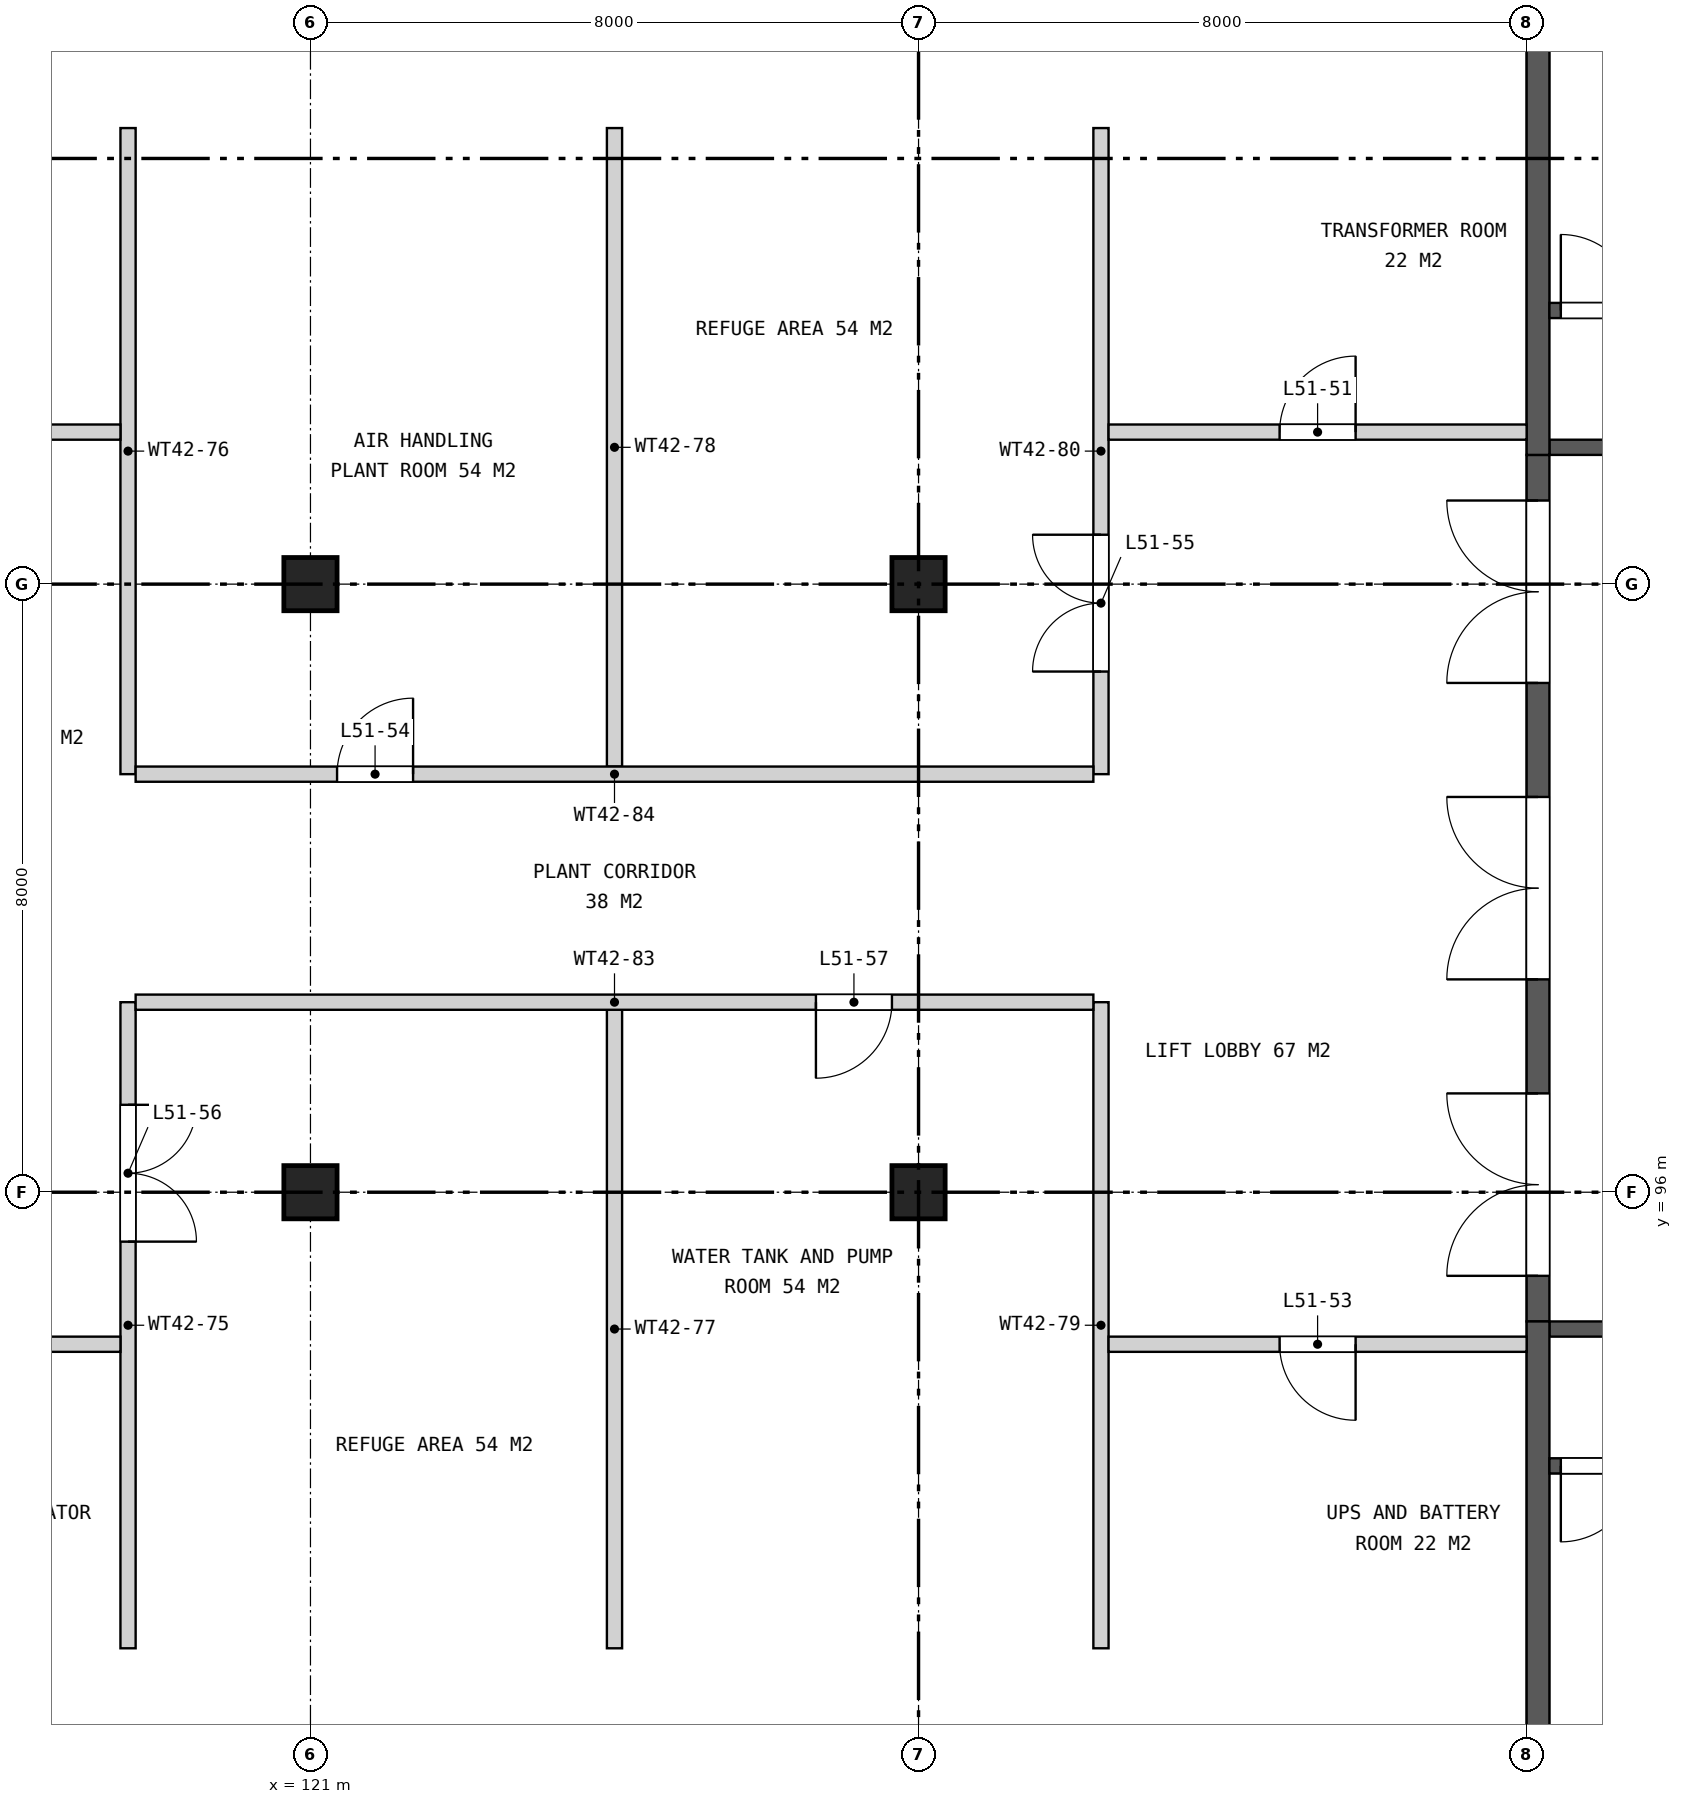
"""IFC4 building model, lengths in metres.
Left out: names, types, materials, properties, quantities, classifications, styles, units other than length and angle.
Written with IfcOpenShell. Run it as: python <this file> out.ifc"""

import sys

from ifc_helpers import new_model, si_unit, direction, frame, frame_2d, origin, origin_2d, place, context, subcontext, project, spatial, rectangle, extrude, element, fill, save


model = new_model("IFC4")
c1 = context("Model", 3, precision=1e-05, world=origin(), true_north=direction((0.0, 1.0)))
c2 = subcontext(c1, "Body", "Model", "MODEL_VIEW")
j1 = project(units=[si_unit("LENGTHUNIT", "METRE"), si_unit("PLANEANGLEUNIT", "RADIAN")], contexts=[c1])
p1 = place(None, origin())
s1 = spatial("IfcSite", under=j1, at=p1, CompositionType="ELEMENT")
p2 = place(p1, origin())
s2 = spatial("IfcBuilding", under=s1, at=p2, CompositionType="ELEMENT")
p3 = place(p2, frame((0.0, 0.0, 237.7)))
s3 = spatial("IfcBuildingStorey", under=s2, at=p3, CompositionType="ELEMENT", Elevation=237.7)
for number, where, z_axis, x_axis in (
    (1, (121.0, 96.0, 0.0), (0.0, 0.0, 1.0), (1.0, 0.0, 0.0)),
    (2, (121.0, 104.0, 0.0), (0.0, 0.0, 1.0), (1.0, 0.0, 0.0)),
    (3, (129.0, 96.0, 0.0), (0.0, 0.0, 1.0), (1.0, 0.0, 0.0)),
    (4, (129.0, 104.0, 0.0), (0.0, 0.0, 1.0), (1.0, 0.0, 0.0)),
):
    element("IfcColumn", number, at=place(p3, frame(where, z_axis=z_axis, x_axis=x_axis)), inside=s3, PredefinedType="COLUMN", context=c2, shape_type="SweptSolid", body=[
        extrude(rectangle(XDim=0.7, YDim=0.7, at=origin_2d()), origin(), (0.0, 0.0, 1.0), 7.4),
    ])
p4 = place(p3, frame((137.15, 94.3, 0.0), z_axis=(0.0, 0.0, 1.0), x_axis=(0.0, 1.0, 0.0)))
e5 = element("IfcWall", 5, at=p4, inside=s3, PredefinedType="SHEAR", context=c2, shape_type="SweptSolid", body=[
    extrude(rectangle(XDim=11.4, YDim=0.3, at=frame_2d((5.7, 0.0))), origin(), (0.0, 0.0, 1.0), 7.4),
])
p5 = place(p4, frame((0.6, 0.0, 0.0)))
e6 = element("IfcOpeningElement", 6, at=p5, cuts=e5, PredefinedType="OPENING", context=c2, shape_type="SweptSolid", body=[
    extrude(rectangle(XDim=2.4, YDim=2.4, at=frame_2d((1.2, 1.2))), frame((0.0, 0.16, 0.0), z_axis=(0.0, -1.0, 0.0), x_axis=(1.0, 0.0, 0.0)), (0.0, 0.0, 1.0), 0.32),
])
p6 = place(p4, frame((4.5, 0.0, 0.0)))
e7 = element("IfcOpeningElement", 7, at=p6, cuts=e5, PredefinedType="OPENING", context=c2, shape_type="SweptSolid", body=[
    extrude(rectangle(XDim=2.4, YDim=2.4, at=frame_2d((1.2, 1.2))), frame((0.0, 0.16, 0.0), z_axis=(0.0, -1.0, 0.0), x_axis=(1.0, 0.0, 0.0)), (0.0, 0.0, 1.0), 0.32),
])
p7 = place(p4, frame((8.4, 0.0, 0.0)))
e8 = element("IfcOpeningElement", 8, at=p7, cuts=e5, PredefinedType="OPENING", context=c2, shape_type="SweptSolid", body=[
    extrude(rectangle(XDim=2.4, YDim=2.4, at=frame_2d((1.2, 1.2))), frame((0.0, 0.16, 0.0), z_axis=(0.0, -1.0, 0.0), x_axis=(1.0, 0.0, 0.0)), (0.0, 0.0, 1.0), 0.32),
])
p8 = place(p3, frame((137.3, 105.8, 0.0), z_axis=(0.0, 0.0, 1.0), x_axis=(1.0, 0.0, 0.0)))
e9 = element("IfcWall", 9, at=p8, inside=s3, PredefinedType="SHEAR", context=c2, shape_type="SweptSolid", body=[
    extrude(rectangle(XDim=15.4, YDim=0.2, at=frame_2d((7.7, 0.0))), origin(), (0.0, 0.0, 1.0), 7.4),
])
p9 = place(p8, frame((0.95, 0.0, 0.0)))
e10 = element("IfcOpeningElement", 10, at=p9, cuts=e9, PredefinedType="OPENING", context=c2, shape_type="SweptSolid", body=[
    extrude(rectangle(XDim=1.1, YDim=2.1, at=frame_2d((0.55, 1.05))), frame((0.0, 0.11, 0.0), z_axis=(0.0, -1.0, 0.0), x_axis=(1.0, 0.0, 0.0)), (0.0, 0.0, 1.0), 0.22),
])
p10 = place(p3, frame((137.15, 105.7, 0.0), z_axis=(0.0, 0.0, 1.0), x_axis=(0.0, 1.0, 0.0)))
e11 = element("IfcWall", 11, at=p10, inside=s3, PredefinedType="SHEAR", context=c2, shape_type="SweptSolid", body=[
    extrude(rectangle(XDim=6.0, YDim=0.3, at=frame_2d((3.0, 0.0))), origin(), (0.0, 0.0, 1.0), 7.4),
])
p11 = place(p3, frame((137.3, 107.6, 0.0), z_axis=(0.0, 0.0, 1.0), x_axis=(1.0, 0.0, 0.0)))
e12 = element("IfcWall", 12, at=p11, inside=s3, PredefinedType="SHEAR", context=c2, shape_type="SweptSolid", body=[
    extrude(rectangle(XDim=6.8, YDim=0.2, at=frame_2d((3.4, 0.0))), origin(), (0.0, 0.0, 1.0), 7.4),
])
p12 = place(p11, frame((0.15, 0.0, 0.0)))
e13 = element("IfcOpeningElement", 13, at=p12, cuts=e12, PredefinedType="OPENING", context=c2, shape_type="SweptSolid", body=[
    extrude(rectangle(XDim=1.0, YDim=2.1, at=frame_2d((0.5, 1.05))), frame((0.0, 0.11, 0.0), z_axis=(0.0, -1.0, 0.0), x_axis=(1.0, 0.0, 0.0)), (0.0, 0.0, 1.0), 0.22),
])
p13 = place(p3, frame((137.3, 94.2, 0.0), z_axis=(0.0, 0.0, 1.0), x_axis=(1.0, 0.0, 0.0)))
e14 = element("IfcWall", 14, at=p13, inside=s3, PredefinedType="SHEAR", context=c2, shape_type="SweptSolid", body=[
    extrude(rectangle(XDim=15.4, YDim=0.2, at=frame_2d((7.7, 0.0))), origin(), (0.0, 0.0, 1.0), 7.4),
])
p14 = place(p13, frame((0.95, 0.0, 0.0)))
e15 = element("IfcOpeningElement", 15, at=p14, cuts=e14, PredefinedType="OPENING", context=c2, shape_type="SweptSolid", body=[
    extrude(rectangle(XDim=1.1, YDim=2.1, at=frame_2d((0.55, 1.05))), frame((0.0, 0.11, 0.0), z_axis=(0.0, -1.0, 0.0), x_axis=(1.0, 0.0, 0.0)), (0.0, 0.0, 1.0), 0.22),
])
p15 = place(p3, frame((137.15, 88.3, 0.0), z_axis=(0.0, 0.0, 1.0), x_axis=(0.0, 1.0, 0.0)))
e16 = element("IfcWall", 16, at=p15, inside=s3, PredefinedType="SHEAR", context=c2, shape_type="SweptSolid", body=[
    extrude(rectangle(XDim=6.0, YDim=0.3, at=frame_2d((3.0, 0.0))), origin(), (0.0, 0.0, 1.0), 7.4),
])
p16 = place(p3, frame((137.3, 92.4, 0.0), z_axis=(0.0, 0.0, 1.0), x_axis=(1.0, 0.0, 0.0)))
e17 = element("IfcWall", 17, at=p16, inside=s3, PredefinedType="SHEAR", context=c2, shape_type="SweptSolid", body=[
    extrude(rectangle(XDim=6.8, YDim=0.2, at=frame_2d((3.4, 0.0))), origin(), (0.0, 0.0, 1.0), 7.4),
])
p17 = place(p16, frame((0.15, 0.0, 0.0)))
e18 = element("IfcOpeningElement", 18, at=p17, cuts=e17, PredefinedType="OPENING", context=c2, shape_type="SweptSolid", body=[
    extrude(rectangle(XDim=1.0, YDim=2.1, at=frame_2d((0.5, 1.05))), frame((0.0, 0.11, 0.0), z_axis=(0.0, -1.0, 0.0), x_axis=(1.0, 0.0, 0.0)), (0.0, 0.0, 1.0), 0.22),
])
p18 = place(p3, frame((118.6, 90.0, 0.0), z_axis=(0.0, 0.0, 1.0), x_axis=(0.0, 1.0, 0.0)))
e19 = element("IfcWall", 19, at=p18, inside=s3, PredefinedType="SOLIDWALL", context=c2, shape_type="SweptSolid", body=[
    extrude(rectangle(XDim=8.5, YDim=0.2, at=frame_2d((4.25, 0.0))), origin(), (0.0, 0.0, 1.0), 6.643),
])
p19 = place(p18, frame((5.35, 0.0, 0.0)))
e20 = element("IfcOpeningElement", 20, at=p19, cuts=e19, PredefinedType="OPENING", context=c2, shape_type="SweptSolid", body=[
    extrude(rectangle(XDim=1.8, YDim=2.1, at=frame_2d((0.9, 1.05))), frame((0.0, 0.11, 0.0), z_axis=(0.0, -1.0, 0.0), x_axis=(1.0, 0.0, 0.0)), (0.0, 0.0, 1.0), 0.22),
])
p20 = place(p3, frame((118.6, 101.5, 0.0), z_axis=(0.0, 0.0, 1.0), x_axis=(0.0, 1.0, 0.0)))
e21 = element("IfcWall", 21, at=p20, inside=s3, PredefinedType="SOLIDWALL", context=c2, shape_type="SweptSolid", body=[
    extrude(rectangle(XDim=8.5, YDim=0.2, at=frame_2d((4.25, 0.0))), origin(), (0.0, 0.0, 1.0), 6.643),
])
for number, where, z_axis, x_axis in (
    (22, (125.0, 90.0, 0.0), (0.0, 0.0, 1.0), (0.0, 1.0, 0.0)),
    (23, (125.0, 101.6, 0.0), (0.0, 0.0, 1.0), (0.0, 1.0, 0.0)),
):
    element("IfcWall", number, at=place(p3, frame(where, z_axis=z_axis, x_axis=x_axis)), inside=s3, PredefinedType="SOLIDWALL", context=c2, shape_type="SweptSolid", body=[
        extrude(rectangle(XDim=8.4, YDim=0.2, at=frame_2d((4.2, 0.0))), origin(), (0.0, 0.0, 1.0), 6.643),
    ])
p21 = place(p3, frame((131.4, 90.0, 0.0), z_axis=(0.0, 0.0, 1.0), x_axis=(0.0, 1.0, 0.0)))
e24 = element("IfcWall", 24, at=p21, inside=s3, PredefinedType="SOLIDWALL", context=c2, shape_type="SweptSolid", body=[
    extrude(rectangle(XDim=8.5, YDim=0.2, at=frame_2d((4.25, 0.0))), origin(), (0.0, 0.0, 1.0), 6.643),
])
p22 = place(p3, frame((131.4, 101.5, 0.0), z_axis=(0.0, 0.0, 1.0), x_axis=(0.0, 1.0, 0.0)))
e25 = element("IfcWall", 25, at=p22, inside=s3, PredefinedType="SOLIDWALL", context=c2, shape_type="SweptSolid", body=[
    extrude(rectangle(XDim=8.5, YDim=0.2, at=frame_2d((4.25, 0.0))), origin(), (0.0, 0.0, 1.0), 6.643),
])
p23 = place(p22, frame((1.35, 0.0, 0.0)))
e26 = element("IfcOpeningElement", 26, at=p23, cuts=e25, PredefinedType="OPENING", context=c2, shape_type="SweptSolid", body=[
    extrude(rectangle(XDim=1.8, YDim=2.1, at=frame_2d((0.9, 1.05))), frame((0.0, 0.11, 0.0), z_axis=(0.0, -1.0, 0.0), x_axis=(1.0, 0.0, 0.0)), (0.0, 0.0, 1.0), 0.22),
])
p24 = place(p3, frame((113.0, 94.0, 0.0), z_axis=(0.0, 0.0, 1.0), x_axis=(1.0, 0.0, 0.0)))
e27 = element("IfcWall", 27, at=p24, inside=s3, PredefinedType="SOLIDWALL", context=c2, shape_type="SweptSolid", body=[
    extrude(rectangle(XDim=5.5, YDim=0.2, at=frame_2d((2.75, 0.0))), origin(), (0.0, 0.0, 1.0), 6.643),
])
p25 = place(p24, frame((2.25, 0.0, 0.0)))
e28 = element("IfcOpeningElement", 28, at=p25, cuts=e27, PredefinedType="OPENING", context=c2, shape_type="SweptSolid", body=[
    extrude(rectangle(XDim=1.0, YDim=2.1, at=frame_2d((0.5, 1.05))), frame((0.0, 0.11, 0.0), z_axis=(0.0, -1.0, 0.0), x_axis=(1.0, 0.0, 0.0)), (0.0, 0.0, 1.0), 0.22),
])
p26 = place(p3, frame((131.5, 94.0, 0.0), z_axis=(0.0, 0.0, 1.0), x_axis=(1.0, 0.0, 0.0)))
e29 = element("IfcWall", 29, at=p26, inside=s3, PredefinedType="SOLIDWALL", context=c2, shape_type="SweptSolid", body=[
    extrude(rectangle(XDim=5.5, YDim=0.2, at=frame_2d((2.75, 0.0))), origin(), (0.0, 0.0, 1.0), 6.643),
])
p27 = place(p26, frame((2.25, 0.0, 0.0)))
e30 = element("IfcOpeningElement", 30, at=p27, cuts=e29, PredefinedType="OPENING", context=c2, shape_type="SweptSolid", body=[
    extrude(rectangle(XDim=1.0, YDim=2.1, at=frame_2d((0.5, 1.05))), frame((0.0, 0.11, 0.0), z_axis=(0.0, -1.0, 0.0), x_axis=(1.0, 0.0, 0.0)), (0.0, 0.0, 1.0), 0.22),
])
p28 = place(p3, frame((118.7, 98.5, 0.0), z_axis=(0.0, 0.0, 1.0), x_axis=(1.0, 0.0, 0.0)))
e31 = element("IfcWall", 31, at=p28, inside=s3, PredefinedType="SOLIDWALL", context=c2, shape_type="SweptSolid", body=[
    extrude(rectangle(XDim=12.6, YDim=0.2, at=frame_2d((6.3, 0.0))), origin(), (0.0, 0.0, 1.0), 6.643),
])
p29 = place(p28, frame((8.95, 0.0, 0.0)))
e32 = element("IfcOpeningElement", 32, at=p29, cuts=e31, PredefinedType="OPENING", context=c2, shape_type="SweptSolid", body=[
    extrude(rectangle(XDim=1.0, YDim=2.1, at=frame_2d((0.5, 1.05))), frame((0.0, 0.11, 0.0), z_axis=(0.0, -1.0, 0.0), x_axis=(1.0, 0.0, 0.0)), (0.0, 0.0, 1.0), 0.22),
])
p30 = place(p3, frame((118.7, 101.5, 0.0), z_axis=(0.0, 0.0, 1.0), x_axis=(1.0, 0.0, 0.0)))
e33 = element("IfcWall", 33, at=p30, inside=s3, PredefinedType="SOLIDWALL", context=c2, shape_type="SweptSolid", body=[
    extrude(rectangle(XDim=12.6, YDim=0.2, at=frame_2d((6.3, 0.0))), origin(), (0.0, 0.0, 1.0), 6.643),
])
p31 = place(p30, frame((2.65, 0.0, 0.0)))
e34 = element("IfcOpeningElement", 34, at=p31, cuts=e33, PredefinedType="OPENING", context=c2, shape_type="SweptSolid", body=[
    extrude(rectangle(XDim=1.0, YDim=2.1, at=frame_2d((0.5, 1.05))), frame((0.0, 0.11, 0.0), z_axis=(0.0, -1.0, 0.0), x_axis=(1.0, 0.0, 0.0)), (0.0, 0.0, 1.0), 0.22),
])
p32 = place(p3, frame((113.0, 106.0, 0.0), z_axis=(0.0, 0.0, 1.0), x_axis=(1.0, 0.0, 0.0)))
e35 = element("IfcWall", 35, at=p32, inside=s3, PredefinedType="SOLIDWALL", context=c2, shape_type="SweptSolid", body=[
    extrude(rectangle(XDim=5.5, YDim=0.2, at=frame_2d((2.75, 0.0))), origin(), (0.0, 0.0, 1.0), 6.643),
])
p33 = place(p32, frame((2.25, 0.0, 0.0)))
e36 = element("IfcOpeningElement", 36, at=p33, cuts=e35, PredefinedType="OPENING", context=c2, shape_type="SweptSolid", body=[
    extrude(rectangle(XDim=1.0, YDim=2.1, at=frame_2d((0.5, 1.05))), frame((0.0, 0.11, 0.0), z_axis=(0.0, -1.0, 0.0), x_axis=(1.0, 0.0, 0.0)), (0.0, 0.0, 1.0), 0.22),
])
p34 = place(p3, frame((131.5, 106.0, 0.0), z_axis=(0.0, 0.0, 1.0), x_axis=(1.0, 0.0, 0.0)))
e37 = element("IfcWall", 37, at=p34, inside=s3, PredefinedType="SOLIDWALL", context=c2, shape_type="SweptSolid", body=[
    extrude(rectangle(XDim=5.5, YDim=0.2, at=frame_2d((2.75, 0.0))), origin(), (0.0, 0.0, 1.0), 6.643),
])
p35 = place(p34, frame((2.25, 0.0, 0.0)))
e38 = element("IfcOpeningElement", 38, at=p35, cuts=e37, PredefinedType="OPENING", context=c2, shape_type="SweptSolid", body=[
    extrude(rectangle(XDim=1.0, YDim=2.1, at=frame_2d((0.5, 1.05))), frame((0.0, 0.11, 0.0), z_axis=(0.0, -1.0, 0.0), x_axis=(1.0, 0.0, 0.0)), (0.0, 0.0, 1.0), 0.22),
])
p36 = place(p5, origin())
e39 = element("IfcDoor", 39, at=p36, inside=s3, OperationType="DOUBLE_DOOR_SINGLE_SWING", PredefinedType="DOOR", context=c2, shape_type="SweptSolid", body=[
    extrude(rectangle(XDim=2.4, YDim=2.4, at=frame_2d((1.2, 1.2))), frame((0.0, 0.025, 0.0), z_axis=(0.0, -1.0, 0.0), x_axis=(1.0, 0.0, 0.0)), (0.0, 0.0, 1.0), 0.05),
])
fill(e6, e39)
p37 = place(p6, origin())
e40 = element("IfcDoor", 40, at=p37, inside=s3, OperationType="DOUBLE_DOOR_SINGLE_SWING", PredefinedType="DOOR", context=c2, shape_type="SweptSolid", body=[
    extrude(rectangle(XDim=2.4, YDim=2.4, at=frame_2d((1.2, 1.2))), frame((0.0, 0.025, 0.0), z_axis=(0.0, -1.0, 0.0), x_axis=(1.0, 0.0, 0.0)), (0.0, 0.0, 1.0), 0.05),
])
fill(e7, e40)
p38 = place(p7, origin())
e41 = element("IfcDoor", 41, at=p38, inside=s3, OperationType="DOUBLE_DOOR_SINGLE_SWING", PredefinedType="DOOR", context=c2, shape_type="SweptSolid", body=[
    extrude(rectangle(XDim=2.4, YDim=2.4, at=frame_2d((1.2, 1.2))), frame((0.0, 0.025, 0.0), z_axis=(0.0, -1.0, 0.0), x_axis=(1.0, 0.0, 0.0)), (0.0, 0.0, 1.0), 0.05),
])
fill(e8, e41)
p39 = place(p12, origin())
e42 = element("IfcDoor", 42, at=p39, inside=s3, OperationType="SINGLE_SWING_LEFT", PredefinedType="DOOR", context=c2, shape_type="SweptSolid", body=[
    extrude(rectangle(XDim=1.0, YDim=2.1, at=frame_2d((0.5, 1.05))), frame((0.0, 0.025, 0.0), z_axis=(0.0, -1.0, 0.0), x_axis=(1.0, 0.0, 0.0)), (0.0, 0.0, 1.0), 0.05),
])
fill(e13, e42)
p40 = place(p17, frame((1.0, 0.0, 0.0), z_axis=(0.0, 0.0, 1.0), x_axis=(-1.0, 0.0, 0.0)))
e43 = element("IfcDoor", 43, at=p40, inside=s3, OperationType="SINGLE_SWING_RIGHT", PredefinedType="DOOR", context=c2, shape_type="SweptSolid", body=[
    extrude(rectangle(XDim=1.0, YDim=2.1, at=frame_2d((0.5, 1.05))), frame((0.0, 0.025, 0.0), z_axis=(0.0, -1.0, 0.0), x_axis=(1.0, 0.0, 0.0)), (0.0, 0.0, 1.0), 0.05),
])
fill(e18, e43)
p41 = place(p35, origin())
e44 = element("IfcDoor", 44, at=p41, inside=s3, OperationType="SINGLE_SWING_RIGHT", PredefinedType="DOOR", context=c2, shape_type="SweptSolid", body=[
    extrude(rectangle(XDim=1.0, YDim=2.1, at=frame_2d((0.5, 1.05))), frame((0.0, 0.025, 0.0), z_axis=(0.0, -1.0, 0.0), x_axis=(1.0, 0.0, 0.0)), (0.0, 0.0, 1.0), 0.05),
])
fill(e38, e44)
p42 = place(p27, frame((1.0, 0.0, 0.0), z_axis=(0.0, 0.0, 1.0), x_axis=(-1.0, 0.0, 0.0)))
e45 = element("IfcDoor", 45, at=p42, inside=s3, OperationType="SINGLE_SWING_LEFT", PredefinedType="DOOR", context=c2, shape_type="SweptSolid", body=[
    extrude(rectangle(XDim=1.0, YDim=2.1, at=frame_2d((0.5, 1.05))), frame((0.0, 0.025, 0.0), z_axis=(0.0, -1.0, 0.0), x_axis=(1.0, 0.0, 0.0)), (0.0, 0.0, 1.0), 0.05),
])
fill(e30, e45)
p43 = place(p31, origin())
e46 = element("IfcDoor", 46, at=p43, inside=s3, OperationType="SINGLE_SWING_RIGHT", PredefinedType="DOOR", context=c2, shape_type="SweptSolid", body=[
    extrude(rectangle(XDim=1.0, YDim=2.1, at=frame_2d((0.5, 1.05))), frame((0.0, 0.025, 0.0), z_axis=(0.0, -1.0, 0.0), x_axis=(1.0, 0.0, 0.0)), (0.0, 0.0, 1.0), 0.05),
])
fill(e34, e46)
p44 = place(p23, origin())
e47 = element("IfcDoor", 47, at=p44, inside=s3, OperationType="DOUBLE_DOOR_SINGLE_SWING", PredefinedType="DOOR", context=c2, shape_type="SweptSolid", body=[
    extrude(rectangle(XDim=1.8, YDim=2.1, at=frame_2d((0.9, 1.05))), frame((0.0, 0.025, 0.0), z_axis=(0.0, -1.0, 0.0), x_axis=(1.0, 0.0, 0.0)), (0.0, 0.0, 1.0), 0.05),
])
fill(e26, e47)
p45 = place(p19, frame((1.8, 0.0, 0.0), z_axis=(0.0, 0.0, 1.0), x_axis=(-1.0, 0.0, 0.0)))
e48 = element("IfcDoor", 48, at=p45, inside=s3, OperationType="DOUBLE_DOOR_SINGLE_SWING", PredefinedType="DOOR", context=c2, shape_type="SweptSolid", body=[
    extrude(rectangle(XDim=1.8, YDim=2.1, at=frame_2d((0.9, 1.05))), frame((0.0, 0.025, 0.0), z_axis=(0.0, -1.0, 0.0), x_axis=(1.0, 0.0, 0.0)), (0.0, 0.0, 1.0), 0.05),
])
fill(e20, e48)
p46 = place(p29, frame((1.0, 0.0, 0.0), z_axis=(0.0, 0.0, 1.0), x_axis=(-1.0, 0.0, 0.0)))
e49 = element("IfcDoor", 49, at=p46, inside=s3, OperationType="SINGLE_SWING_RIGHT", PredefinedType="DOOR", context=c2, shape_type="SweptSolid", body=[
    extrude(rectangle(XDim=1.0, YDim=2.1, at=frame_2d((0.5, 1.05))), frame((0.0, 0.025, 0.0), z_axis=(0.0, -1.0, 0.0), x_axis=(1.0, 0.0, 0.0)), (0.0, 0.0, 1.0), 0.05),
])
fill(e32, e49)
save(model, sys.argv[1])
